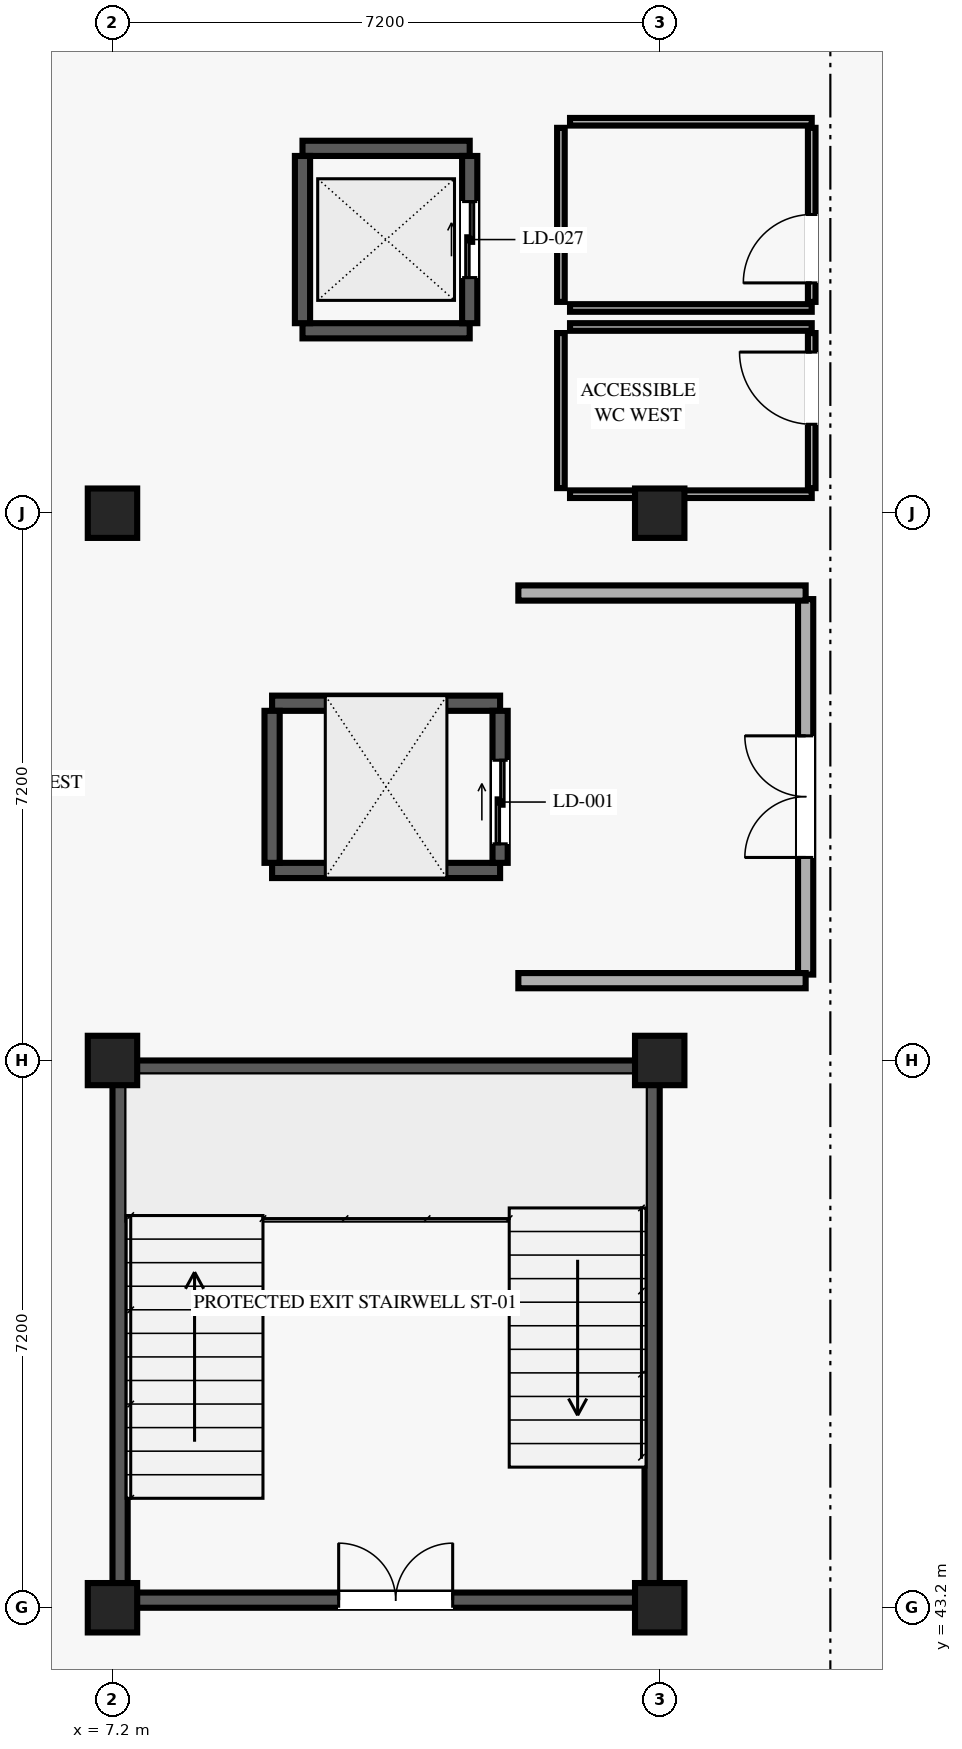
"""IFC4 building model, lengths in metres.
Left out: names, types, materials, properties, quantities, classifications, styles, units other than length and angle.
Written with IfcOpenShell. Run it as: python <this file> out.ifc"""

import sys

from ifc_helpers import new_model, si_unit, direction, frame, frame_2d, origin, origin_2d, place, context, subcontext, project, spatial, rectangle, extrude, element, fill, save


model = new_model("IFC4")
c1 = context("Model", 3, precision=1e-05, world=origin(), true_north=direction((0.0, 1.0)))
c2 = subcontext(c1, "Body", "Model", "MODEL_VIEW")
j1 = project(units=[si_unit("LENGTHUNIT", "METRE"), si_unit("PLANEANGLEUNIT", "RADIAN")], contexts=[c1])
p1 = place(None, origin())
s1 = spatial("IfcSite", under=j1, at=p1, CompositionType="ELEMENT")
p2 = place(p1, origin())
s2 = spatial("IfcBuilding", under=s1, at=p2, CompositionType="ELEMENT")
p3 = place(p2, frame((0.0, 0.0, -4.5)))
s3 = spatial("IfcBuildingStorey", under=s2, at=p3, CompositionType="ELEMENT", Elevation=-4.5)
for number, where, z_axis, x_axis in (
    (1, (7.2, 43.2, 0.0), (0.0, 0.0, 1.0), (1.0, 0.0, 0.0)),
    (2, (7.2, 50.4, 0.0), (0.0, 0.0, 1.0), (1.0, 0.0, 0.0)),
    (3, (7.2, 57.6, 0.0), (0.0, 0.0, 1.0), (1.0, 0.0, 0.0)),
    (4, (14.4, 43.2, 0.0), (0.0, 0.0, 1.0), (1.0, 0.0, 0.0)),
    (5, (14.4, 50.4, 0.0), (0.0, 0.0, 1.0), (1.0, 0.0, 0.0)),
    (6, (14.4, 57.6, 0.0), (0.0, 0.0, 1.0), (1.0, 0.0, 0.0)),
):
    element("IfcColumn", number, at=place(p3, frame(where, z_axis=z_axis, x_axis=x_axis)), inside=s3, PredefinedType="COLUMN", context=c2, shape_type="SweptSolid", body=[
        extrude(rectangle(XDim=0.65, YDim=0.65, at=origin_2d()), origin(), (0.0, 0.0, 1.0), 4.5),
    ])
p4 = place(p3, frame((7.4, 43.3, 0.0), z_axis=(0.0, 0.0, 1.0), x_axis=(1.0, 0.0, 0.0)))
e7 = element("IfcWall", 7, at=p4, inside=s3, PredefinedType="SHEAR", context=c2, shape_type="SweptSolid", body=[
    extrude(rectangle(XDim=6.8, YDim=0.2, at=frame_2d((3.4, 0.0))), origin(), (0.0, 0.0, 1.0), 4.25),
])
p5 = place(p4, frame((2.776, 0.0, 0.0)))
e8 = element("IfcOpeningElement", 8, at=p5, cuts=e7, PredefinedType="OPENING", context=c2, shape_type="SweptSolid", body=[
    extrude(rectangle(XDim=1.5, YDim=2.15, at=frame_2d((0.75, 1.075))), frame((0.0, 0.11, 0.0), z_axis=(0.0, -1.0, 0.0), x_axis=(1.0, 0.0, 0.0)), (0.0, 0.0, 1.0), 0.22),
])
for number, where, z_axis, x_axis in (
    (9, (7.4, 50.3, 0.0), (0.0, 0.0, 1.0), (1.0, 0.0, 0.0)),
    (10, (7.3, 43.4, 0.0), (0.0, 0.0, 1.0), (0.0, 1.0, 0.0)),
    (11, (14.3, 43.4, 0.0), (0.0, 0.0, 1.0), (0.0, 1.0, 0.0)),
):
    element("IfcWall", number, at=place(p3, frame(where, z_axis=z_axis, x_axis=x_axis)), inside=s3, PredefinedType="SHEAR", context=c2, shape_type="SweptSolid", body=[
        extrude(rectangle(XDim=6.8, YDim=0.2, at=frame_2d((3.4, 0.0))), origin(), (0.0, 0.0, 1.0), 4.25),
    ])
for number, where, z_axis, x_axis in (
    (12, (9.3, 52.9, 0.0), (0.0, 0.0, 1.0), (1.0, 0.0, 0.0)),
    (13, (9.3, 55.1, 0.0), (0.0, 0.0, 1.0), (1.0, 0.0, 0.0)),
):
    element("IfcWall", number, at=place(p3, frame(where, z_axis=z_axis, x_axis=x_axis)), inside=s3, PredefinedType="SHEAR", context=c2, shape_type="SweptSolid", body=[
        extrude(rectangle(XDim=3.0, YDim=0.2, at=frame_2d((1.5, 0.0))), origin(), (0.0, 0.0, 1.0), 4.25),
    ])
p6 = place(p3, frame((9.3, 53.0, 0.0), z_axis=(0.0, 0.0, 1.0), x_axis=(0.0, 1.0, 0.0)))
e14 = element("IfcWall", 14, at=p6, inside=s3, PredefinedType="SHEAR", context=c2, shape_type="SweptSolid", body=[
    extrude(rectangle(XDim=2.0, YDim=0.2, at=frame_2d((1.0, 0.0))), origin(), (0.0, 0.0, 1.0), 4.25),
])
p7 = place(p3, frame((12.3, 53.0, 0.0), z_axis=(0.0, 0.0, 1.0), x_axis=(0.0, 1.0, 0.0)))
e15 = element("IfcWall", 15, at=p7, inside=s3, PredefinedType="SHEAR", context=c2, shape_type="SweptSolid", body=[
    extrude(rectangle(XDim=2.0, YDim=0.2, at=frame_2d((1.0, 0.0))), origin(), (0.0, 0.0, 1.0), 4.25),
])
p8 = place(p7, frame((0.25, 0.0, 0.0)))
e16 = element("IfcOpeningElement", 16, at=p8, cuts=e15, PredefinedType="OPENING", context=c2, shape_type="SweptSolid", body=[
    extrude(rectangle(XDim=1.1, YDim=2.15, at=frame_2d((0.55, 1.075))), frame((0.0, 0.11, 0.0), z_axis=(0.0, -1.0, 0.0), x_axis=(1.0, 0.0, 0.0)), (0.0, 0.0, 1.0), 0.22),
])
for number, where, z_axis, x_axis in (
    (17, (9.7, 60.0, 0.0), (0.0, 0.0, 1.0), (1.0, 0.0, 0.0)),
    (18, (9.7, 62.4, 0.0), (0.0, 0.0, 1.0), (1.0, 0.0, 0.0)),
    (19, (9.7, 60.1, 0.0), (0.0, 0.0, 1.0), (0.0, 1.0, 0.0)),
):
    element("IfcWall", number, at=place(p3, frame(where, z_axis=z_axis, x_axis=x_axis)), inside=s3, PredefinedType="SHEAR", context=c2, shape_type="SweptSolid", body=[
        extrude(rectangle(XDim=2.2, YDim=0.2, at=frame_2d((1.1, 0.0))), origin(), (0.0, 0.0, 1.0), 4.25),
    ])
p9 = place(p3, frame((11.9, 60.1, 0.0), z_axis=(0.0, 0.0, 1.0), x_axis=(0.0, 1.0, 0.0)))
e20 = element("IfcWall", 20, at=p9, inside=s3, PredefinedType="SHEAR", context=c2, shape_type="SweptSolid", body=[
    extrude(rectangle(XDim=2.2, YDim=0.2, at=frame_2d((1.1, 0.0))), origin(), (0.0, 0.0, 1.0), 4.25),
])
p10 = place(p9, frame((0.6, 0.0, 0.0)))
e21 = element("IfcOpeningElement", 21, at=p10, cuts=e20, PredefinedType="OPENING", context=c2, shape_type="SweptSolid", body=[
    extrude(rectangle(XDim=1.0, YDim=2.1, at=frame_2d((0.5, 1.05))), frame((0.0, 0.11, 0.0), z_axis=(0.0, -1.0, 0.0), x_axis=(1.0, 0.0, 0.0)), (0.0, 0.0, 1.0), 0.22),
])
p11 = place(p3, frame((16.32, 51.53, 0.0), z_axis=(0.0, 0.0, 1.0), x_axis=(0.0, 1.0, 0.0)))
e22 = element("IfcWall", 22, at=p11, inside=s3, PredefinedType="SOLIDWALL", context=c2, shape_type="SweptSolid", body=[
    extrude(rectangle(XDim=4.94, YDim=0.2, at=frame_2d((2.47, 0.0))), origin(), (0.0, 0.0, 1.0), 4.25),
])
p12 = place(p11, frame((1.541, 0.0, 0.0)))
e23 = element("IfcOpeningElement", 23, at=p12, cuts=e22, PredefinedType="OPENING", context=c2, shape_type="SweptSolid", body=[
    extrude(rectangle(XDim=1.6, YDim=2.2, at=frame_2d((0.8, 1.1))), frame((0.0, 0.11, 0.0), z_axis=(0.0, -1.0, 0.0), x_axis=(1.0, 0.0, 0.0)), (0.0, 0.0, 1.0), 0.22),
])
for number, where, z_axis, x_axis in (
    (24, (12.54, 51.45, 0.0), (0.0, 0.0, 1.0), (1.0, 0.0, 0.0)),
    (25, (12.54, 56.55, 0.0), (0.0, 0.0, 1.0), (1.0, 0.0, 0.0)),
):
    element("IfcWall", number, at=place(p3, frame(where, z_axis=z_axis, x_axis=x_axis)), inside=s3, PredefinedType="SOLIDWALL", context=c2, shape_type="SweptSolid", body=[
        extrude(rectangle(XDim=3.78, YDim=0.2, at=frame_2d((1.89, 0.0))), origin(), (0.0, 0.0, 1.0), 4.25),
    ])
p13 = place(p3, frame((16.4, 57.93, 0.0), z_axis=(0.0, 0.0, 1.0), x_axis=(0.0, 1.0, 0.0)))
e26 = element("IfcWall", 26, at=p13, inside=s3, PredefinedType="PARTITIONING", context=c2, shape_type="SweptSolid", body=[
    extrude(rectangle(XDim=2.04, YDim=0.1, at=frame_2d((1.02, 0.0))), origin(), (0.0, 0.0, 1.0), 4.25),
])
p14 = place(p13, frame((0.84, 0.0, 0.0)))
e27 = element("IfcOpeningElement", 27, at=p14, cuts=e26, PredefinedType="OPENING", context=c2, shape_type="SweptSolid", body=[
    extrude(rectangle(XDim=0.95, YDim=2.1, at=frame_2d((0.475, 1.05))), frame((0.0, 0.06, 0.0), z_axis=(0.0, -1.0, 0.0), x_axis=(1.0, 0.0, 0.0)), (0.0, 0.0, 1.0), 0.12),
])
p15 = place(p3, frame((13.22, 57.85, 0.0), z_axis=(0.0, 0.0, 1.0), x_axis=(1.0, 0.0, 0.0)))
e28 = element("IfcWall", 28, at=p15, inside=s3, PredefinedType="PARTITIONING", context=c2, shape_type="SweptSolid", body=[
    extrude(rectangle(XDim=3.18, YDim=0.1, at=frame_2d((1.59, 0.0))), origin(), (0.0, 0.0, 1.0), 3.59),
])
p16 = place(p3, frame((13.22, 60.05, 0.0), z_axis=(0.0, 0.0, 1.0), x_axis=(1.0, 0.0, 0.0)))
e29 = element("IfcWall", 29, at=p16, inside=s3, PredefinedType="PARTITIONING", context=c2, shape_type="SweptSolid", body=[
    extrude(rectangle(XDim=3.18, YDim=0.1, at=frame_2d((1.59, 0.0))), origin(), (0.0, 0.0, 1.0), 4.25),
])
p17 = place(p3, frame((13.1, 57.93, 0.0), z_axis=(0.0, 0.0, 1.0), x_axis=(0.0, 1.0, 0.0)))
e30 = element("IfcWall", 30, at=p17, inside=s3, PredefinedType="PARTITIONING", context=c2, shape_type="SweptSolid", body=[
    extrude(rectangle(XDim=2.04, YDim=0.1, at=frame_2d((1.02, 0.0))), origin(), (0.0, 0.0, 1.0), 4.25),
])
p18 = place(p3, frame((16.4, 60.38, 0.0), z_axis=(0.0, 0.0, 1.0), x_axis=(0.0, 1.0, 0.0)))
e31 = element("IfcWall", 31, at=p18, inside=s3, PredefinedType="PARTITIONING", context=c2, shape_type="SweptSolid", body=[
    extrude(rectangle(XDim=2.29, YDim=0.1, at=frame_2d((1.145, 0.0))), origin(), (0.0, 0.0, 1.0), 4.25),
])
p19 = place(p18, frame((0.25, 0.0, 0.0)))
e32 = element("IfcOpeningElement", 32, at=p19, cuts=e31, PredefinedType="OPENING", context=c2, shape_type="SweptSolid", body=[
    extrude(rectangle(XDim=0.9, YDim=2.1, at=frame_2d((0.45, 1.05))), frame((0.0, 0.06, 0.0), z_axis=(0.0, -1.0, 0.0), x_axis=(1.0, 0.0, 0.0)), (0.0, 0.0, 1.0), 0.12),
])
for number, where, z_axis, x_axis in (
    (33, (13.22, 60.3, 0.0), (0.0, 0.0, 1.0), (1.0, 0.0, 0.0)),
    (34, (13.22, 62.75, 0.0), (0.0, 0.0, 1.0), (1.0, 0.0, 0.0)),
):
    element("IfcWall", number, at=place(p3, frame(where, z_axis=z_axis, x_axis=x_axis)), inside=s3, PredefinedType="PARTITIONING", context=c2, shape_type="SweptSolid", body=[
        extrude(rectangle(XDim=3.18, YDim=0.1, at=frame_2d((1.59, 0.0))), origin(), (0.0, 0.0, 1.0), 4.25),
    ])
p20 = place(p3, frame((13.1, 60.38, 0.0), z_axis=(0.0, 0.0, 1.0), x_axis=(0.0, 1.0, 0.0)))
e35 = element("IfcWall", 35, at=p20, inside=s3, PredefinedType="PARTITIONING", context=c2, shape_type="SweptSolid", body=[
    extrude(rectangle(XDim=2.29, YDim=0.1, at=frame_2d((1.145, 0.0))), origin(), (0.0, 0.0, 1.0), 4.25),
])
p21 = place(p5, origin())
e36 = element("IfcDoor", 36, at=p21, inside=s3, OperationType="DOUBLE_DOOR_SINGLE_SWING", PredefinedType="DOOR", context=c2, shape_type="SweptSolid", body=[
    extrude(rectangle(XDim=1.5, YDim=2.15, at=frame_2d((0.75, 1.075))), frame((0.0, 0.025, 0.0), z_axis=(0.0, -1.0, 0.0), x_axis=(1.0, 0.0, 0.0)), (0.0, 0.0, 1.0), 0.05),
])
fill(e8, e36)
p22 = place(p8, origin())
e37 = element("IfcDoor", 37, at=p22, inside=s3, OperationType="DOUBLE_DOOR_SLIDING", PredefinedType="DOOR", context=c2, shape_type="SweptSolid", body=[
    extrude(rectangle(XDim=1.1, YDim=2.15, at=frame_2d((0.55, 1.075))), frame((0.0, 0.025, 0.0), z_axis=(0.0, -1.0, 0.0), x_axis=(1.0, 0.0, 0.0)), (0.0, 0.0, 1.0), 0.05),
])
fill(e16, e37)
p23 = place(p10, origin())
e38 = element("IfcDoor", 38, at=p23, inside=s3, OperationType="DOUBLE_DOOR_SLIDING", PredefinedType="DOOR", context=c2, shape_type="SweptSolid", body=[
    extrude(rectangle(XDim=1.0, YDim=2.1, at=frame_2d((0.5, 1.05))), frame((0.0, 0.025, 0.0), z_axis=(0.0, -1.0, 0.0), x_axis=(1.0, 0.0, 0.0)), (0.0, 0.0, 1.0), 0.05),
])
fill(e21, e38)
p24 = place(p12, origin())
e39 = element("IfcDoor", 39, at=p24, inside=s3, OperationType="DOUBLE_DOOR_SINGLE_SWING", PredefinedType="DOOR", context=c2, shape_type="SweptSolid", body=[
    extrude(rectangle(XDim=1.6, YDim=2.2, at=frame_2d((0.8, 1.1))), frame((0.0, 0.025, 0.0), z_axis=(0.0, -1.0, 0.0), x_axis=(1.0, 0.0, 0.0)), (0.0, 0.0, 1.0), 0.05),
])
fill(e23, e39)
p25 = place(p14, origin())
e40 = element("IfcDoor", 40, at=p25, inside=s3, OperationType="SINGLE_SWING_RIGHT", PredefinedType="DOOR", context=c2, shape_type="SweptSolid", body=[
    extrude(rectangle(XDim=0.95, YDim=2.1, at=frame_2d((0.475, 1.05))), frame((0.0, 0.025, 0.0), z_axis=(0.0, -1.0, 0.0), x_axis=(1.0, 0.0, 0.0)), (0.0, 0.0, 1.0), 0.05),
])
fill(e27, e40)
p26 = place(p19, origin())
e41 = element("IfcDoor", 41, at=p26, inside=s3, OperationType="SINGLE_SWING_LEFT", PredefinedType="DOOR", context=c2, shape_type="SweptSolid", body=[
    extrude(rectangle(XDim=0.9, YDim=2.1, at=frame_2d((0.45, 1.05))), frame((0.0, 0.025, 0.0), z_axis=(0.0, -1.0, 0.0), x_axis=(1.0, 0.0, 0.0)), (0.0, 0.0, 1.0), 0.05),
])
fill(e32, e41)
save(model, sys.argv[1])
